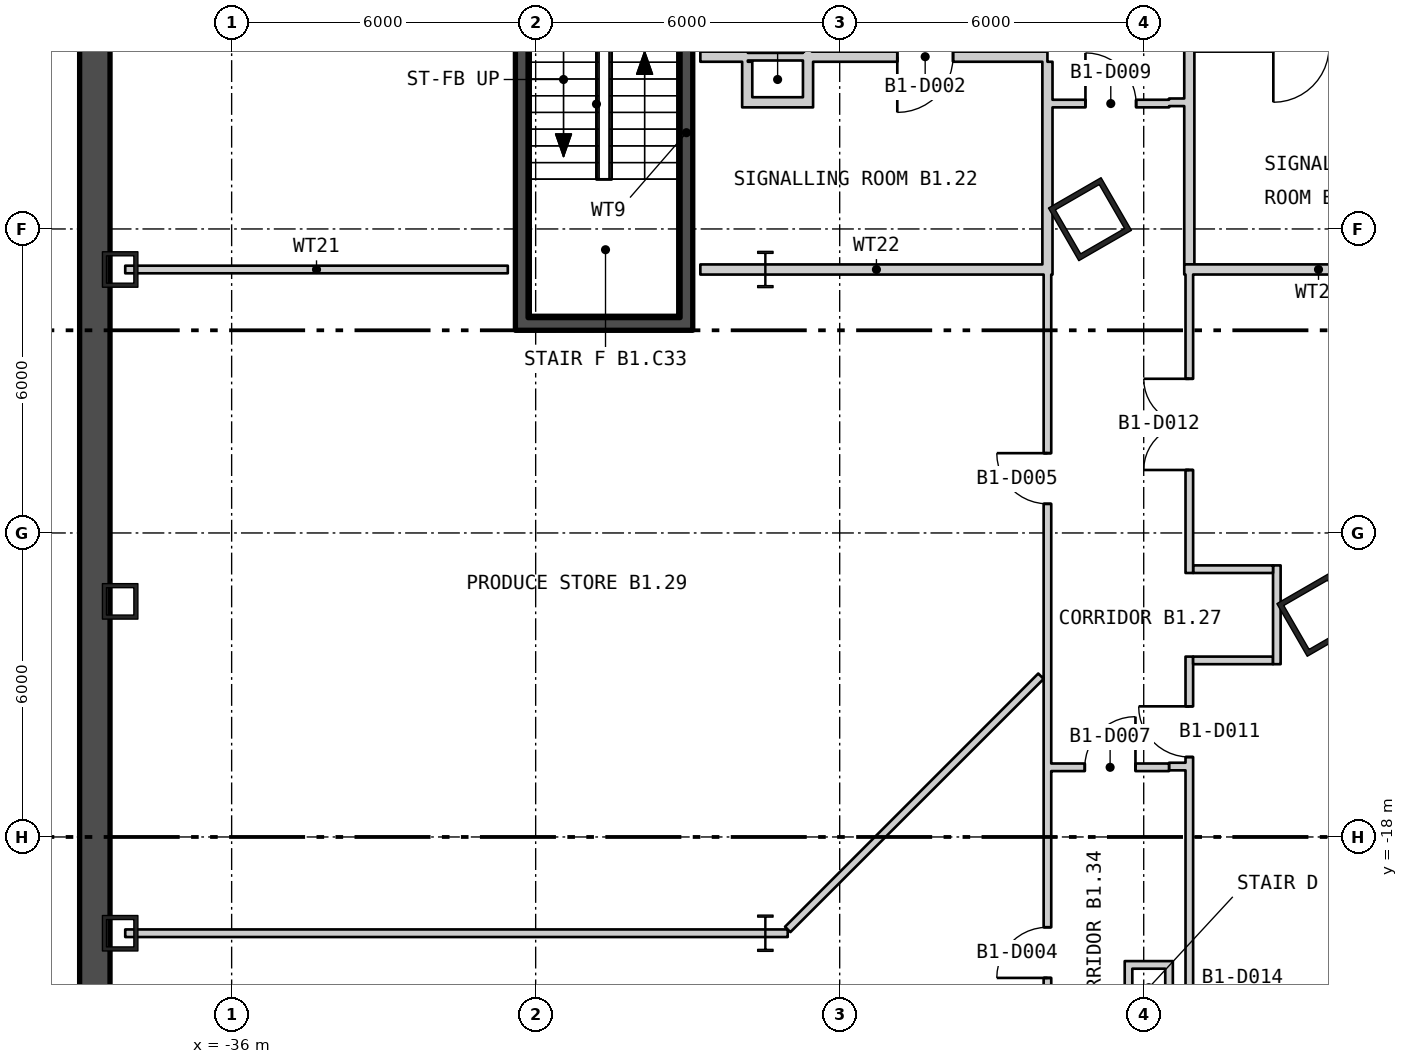
"""IFC4 building model, lengths in metres.
Left out: names, types, materials, properties, quantities, classifications, styles, units other than length and angle.
Written with IfcOpenShell. Run it as: python <this file> out.ifc"""

import sys

from ifc_helpers import new_model, si_unit, direction, frame, frame_2d, origin, origin_2d, place, context, subcontext, project, spatial, rectangle, hollow_rectangle, i_section, extrude, element, fill, save


model = new_model("IFC4")
c1 = context("Model", 3, precision=1e-05, world=origin(), true_north=direction((0.0, 1.0)))
c2 = subcontext(c1, "Body", "Model", "MODEL_VIEW")
j1 = project(units=[si_unit("LENGTHUNIT", "METRE"), si_unit("PLANEANGLEUNIT", "RADIAN")], contexts=[c1])
p1 = place(None, origin())
s1 = spatial("IfcSite", under=j1, at=p1, CompositionType="ELEMENT")
p2 = place(p1, origin())
s2 = spatial("IfcBuilding", under=s1, at=p2, CompositionType="ELEMENT")
p3 = place(p2, frame((0.0, 0.0, -5.7)))
s3 = spatial("IfcBuildingStorey", under=s2, at=p3, CompositionType="ELEMENT", Elevation=-5.7)
for number, where, z_axis, x_axis in (
    (1, (-19.061, -5.807, 0.0), (0.0, 0.0, 1.0), (0.5, -0.866, 0.0)),
    (2, (-14.553, -13.615, 0.0), (0.0, 0.0, 1.0), (0.5, -0.866, 0.0)),
):
    element("IfcColumn", number, at=place(p3, frame(where, z_axis=z_axis, x_axis=x_axis)), inside=s3, PredefinedType="COLUMN", context=c2, shape_type="SweptSolid", body=[
        extrude(hollow_rectangle(XDim=1.2, YDim=1.2, WallThickness=0.1, at=origin_2d()), origin(), (0.0, 0.0, 1.0), 5.7),
    ])
for number, where, z_axis, x_axis in (
    (3, (-38.2, -6.8, 0.0), (0.0, 0.0, 1.0), (0.0, -1.0, 0.0)),
    (4, (-38.2, -13.35, 0.0), (0.0, 0.0, 1.0), (0.0, -1.0, 0.0)),
    (5, (-38.2, -19.9, 0.0), (0.0, 0.0, 1.0), (0.0, -1.0, 0.0)),
):
    element("IfcColumn", number, at=place(p3, frame(where, z_axis=z_axis, x_axis=x_axis)), inside=s3, PredefinedType="COLUMN", context=c2, shape_type="SweptSolid", body=[
        extrude(hollow_rectangle(XDim=0.7, YDim=0.7, WallThickness=0.08, at=origin_2d()), origin(), (0.0, 0.0, 1.0), 5.7),
    ])
for number, where, z_axis, x_axis in (
    (6, (-25.467, -6.8, 0.0), (0.0, 0.0, 1.0), (1.0, 0.0, 0.0)),
    (7, (-25.467, -19.9, 0.0), (0.0, 0.0, 1.0), (1.0, 0.0, 0.0)),
):
    element("IfcColumn", number, at=place(p3, frame(where, z_axis=z_axis, x_axis=x_axis)), inside=s3, PredefinedType="COLUMN", context=c2, shape_type="SweptSolid", body=[
        extrude(i_section(OverallWidth=0.304, OverallDepth=0.716, WebThickness=0.021, FlangeThickness=0.04, at=origin_2d()), origin(), (0.0, 0.0, 1.0), 5.7),
    ])
p4 = place(p3, frame((-38.7, -33.2, -0.4), z_axis=(0.0, 0.0, 1.0), x_axis=(0.0, 1.0, 0.0)))
e8 = element("IfcWall", 8, at=p4, inside=s3, PredefinedType="STANDARD", context=c2, shape_type="SweptSolid", body=[
    extrude(rectangle(XDim=52.8, YDim=0.6, at=frame_2d((26.4, 0.0))), origin(), (0.0, 0.0, 1.0), 5.7),
])
p5 = place(p3, frame((-30.275, -7.75, 0.0), z_axis=(0.0, 0.0, 1.0), x_axis=(0.0, 1.0, 0.0)))
e9 = element("IfcWall", 9, at=p5, inside=s3, PredefinedType="SHEAR", context=c2, shape_type="SweptSolid", body=[
    extrude(rectangle(XDim=7.3, YDim=0.25, at=frame_2d((3.65, 0.0))), origin(), (0.0, 0.0, 1.0), 5.25),
])
p6 = place(p3, frame((-27.025, -7.75, 0.0), z_axis=(0.0, 0.0, 1.0), x_axis=(0.0, 1.0, 0.0)))
e10 = element("IfcWall", 10, at=p6, inside=s3, PredefinedType="SHEAR", context=c2, shape_type="SweptSolid", body=[
    extrude(rectangle(XDim=7.3, YDim=0.25, at=frame_2d((3.65, 0.0))), origin(), (0.0, 0.0, 1.0), 5.25),
])
p7 = place(p6, frame((5.7, 0.0, 0.0)))
e11 = element("IfcOpeningElement", 11, at=p7, cuts=e10, PredefinedType="OPENING", context=c2, shape_type="SweptSolid", body=[
    extrude(rectangle(XDim=1.2, YDim=2.1, at=frame_2d((0.6, 1.05))), frame((0.0, 0.135, 0.0), z_axis=(0.0, -1.0, 0.0), x_axis=(1.0, 0.0, 0.0)), (0.0, 0.0, 1.0), 0.27),
])
p8 = place(p3, frame((-30.4, -7.875, 0.0), z_axis=(0.0, 0.0, 1.0), x_axis=(1.0, 0.0, 0.0)))
e12 = element("IfcWall", 12, at=p8, inside=s3, PredefinedType="SHEAR", context=c2, shape_type="SweptSolid", body=[
    extrude(rectangle(XDim=3.5, YDim=0.25, at=frame_2d((1.75, 0.0))), origin(), (0.0, 0.0, 1.0), 5.25),
])
p9 = place(p3, frame((-38.1, -19.9, 0.0), z_axis=(0.0, 0.0, 1.0), x_axis=(1.0, 0.0, 0.0)))
e13 = element("IfcWall", 13, at=p9, inside=s3, PredefinedType="PARTITIONING", context=c2, shape_type="SweptSolid", body=[
    extrude(rectangle(XDim=13.074, YDim=0.15, at=frame_2d((6.537, 0.0))), origin(), (0.0, 0.0, 1.0), 5.25),
])
p10 = place(p3, frame((-38.1, -6.8, 0.0), z_axis=(0.0, 0.0, 1.0), x_axis=(1.0, 0.0, 0.0)))
e14 = element("IfcWall", 14, at=p10, inside=s3, PredefinedType="PARTITIONING", context=c2, shape_type="SweptSolid", body=[
    extrude(rectangle(XDim=7.55, YDim=0.15, at=frame_2d((3.775, 0.0))), origin(), (0.0, 0.0, 1.0), 5.25),
])
p11 = place(p3, frame((-26.75, -6.8, 0.0), z_axis=(0.0, 0.0, 1.0), x_axis=(1.0, 0.0, 0.0)))
e15 = element("IfcWall", 15, at=p11, inside=s3, PredefinedType="PARTITIONING", context=c2, shape_type="SweptSolid", body=[
    extrude(rectangle(XDim=6.95, YDim=0.2, at=frame_2d((3.475, 0.0))), origin(), (0.0, 0.0, 1.0), 5.25),
])
p12 = place(p3, frame((-26.75, -2.6, 0.0), z_axis=(0.0, 0.0, 1.0), x_axis=(1.0, 0.0, 0.0)))
e16 = element("IfcWall", 16, at=p12, inside=s3, PredefinedType="PARTITIONING", context=c2, shape_type="SweptSolid", body=[
    extrude(rectangle(XDim=0.937, YDim=0.2, at=frame_2d((0.469, 0.0))), origin(), (0.0, 0.0, 1.0), 5.25),
])
p13 = place(p3, frame((-25.925, -3.5, 0.0), z_axis=(0.0, 0.0, 1.0), x_axis=(1.0, 0.0, 0.0)))
e17 = element("IfcWall", 17, at=p13, inside=s3, PredefinedType="PARTITIONING", context=c2, shape_type="SweptSolid", body=[
    extrude(rectangle(XDim=1.4, YDim=0.2, at=frame_2d((0.7, 0.0))), origin(), (0.0, 0.0, 1.0), 5.25),
])
p14 = place(p3, frame((-25.825, -3.4, 0.0), z_axis=(0.0, 0.0, 1.0), x_axis=(0.0, 1.0, 0.0)))
e18 = element("IfcWall", 18, at=p14, inside=s3, PredefinedType="PARTITIONING", context=c2, shape_type="SweptSolid", body=[
    extrude(rectangle(XDim=0.7, YDim=0.2, at=frame_2d((0.35, 0.0))), origin(), (0.0, 0.0, 1.0), 5.25),
])
p15 = place(p3, frame((-25.813, -2.6, 0.0), z_axis=(0.0, 0.0, 1.0), x_axis=(1.0, 0.0, 0.0)))
e19 = element("IfcWall", 19, at=p15, inside=s3, PredefinedType="PARTITIONING", context=c2, shape_type="SweptSolid", body=[
    extrude(rectangle(XDim=1.088, YDim=0.15, at=frame_2d((0.544, 0.0))), origin(), (0.0, 0.0, 1.0), 5.25),
])
p16 = place(p3, frame((-25.026, -19.825, 0.0), z_axis=(0.0, 0.0, 1.0), x_axis=(0.707106781187, 0.707106781187, 0.0)))
e20 = element("IfcWall", 20, at=p16, inside=s3, PredefinedType="PARTITIONING", context=c2, shape_type="SweptSolid", body=[
    extrude(rectangle(XDim=7.068, YDim=0.15, at=frame_2d((3.534, 0.0))), origin(), (0.0, 0.0, 1.0), 5.25),
])
p17 = place(p3, frame((-24.725, -2.6, 0.0), z_axis=(0.0, 0.0, 1.0), x_axis=(1.0, 0.0, 0.0)))
e21 = element("IfcWall", 21, at=p17, inside=s3, PredefinedType="PARTITIONING", context=c2, shape_type="SweptSolid", body=[
    extrude(rectangle(XDim=4.825, YDim=0.2, at=frame_2d((2.413, 0.0))), origin(), (0.0, 0.0, 1.0), 5.25),
])
p18 = place(p17, frame((1.862, 0.0, 0.0)))
e22 = element("IfcOpeningElement", 22, at=p18, cuts=e21, PredefinedType="OPENING", context=c2, shape_type="SweptSolid", body=[
    extrude(rectangle(XDim=1.1, YDim=2.1, at=frame_2d((0.55, 1.05))), frame((0.0, 0.11, 0.0), z_axis=(0.0, -1.0, 0.0), x_axis=(1.0, 0.0, 0.0)), (0.0, 0.0, 1.0), 0.22),
])
p19 = place(p3, frame((-24.625, -3.4, 0.0), z_axis=(0.0, 0.0, 1.0), x_axis=(0.0, 1.0, 0.0)))
e23 = element("IfcWall", 23, at=p19, inside=s3, PredefinedType="PARTITIONING", context=c2, shape_type="SweptSolid", body=[
    extrude(rectangle(XDim=0.7, YDim=0.2, at=frame_2d((0.35, 0.0))), origin(), (0.0, 0.0, 1.0), 5.25),
])
p20 = place(p3, frame((-19.9, -23.775, 0.0), z_axis=(0.0, 0.0, 1.0), x_axis=(0.0, 1.0, 0.0)))
e24 = element("IfcWall", 24, at=p20, inside=s3, PredefinedType="PARTITIONING", context=c2, shape_type="SweptSolid", body=[
    extrude(rectangle(XDim=16.875, YDim=0.15, at=frame_2d((8.438, 0.0))), origin(), (0.0, 0.0, 1.0), 5.25),
])
p21 = place(p20, frame((2.993, 0.0, 0.0)))
e25 = element("IfcOpeningElement", 25, at=p21, cuts=e24, PredefinedType="OPENING", context=c2, shape_type="SweptSolid", body=[
    extrude(rectangle(XDim=1.0, YDim=2.1, at=frame_2d((0.5, 1.05))), frame((0.0, 0.085, 0.0), z_axis=(0.0, -1.0, 0.0), x_axis=(1.0, 0.0, 0.0)), (0.0, 0.0, 1.0), 0.17),
])
p22 = place(p20, frame((12.35, 0.0, 0.0)))
e26 = element("IfcOpeningElement", 26, at=p22, cuts=e24, PredefinedType="OPENING", context=c2, shape_type="SweptSolid", body=[
    extrude(rectangle(XDim=1.0, YDim=2.1, at=frame_2d((0.5, 1.05))), frame((0.0, 0.085, 0.0), z_axis=(0.0, -1.0, 0.0), x_axis=(1.0, 0.0, 0.0)), (0.0, 0.0, 1.0), 0.17),
])
p23 = place(p3, frame((-19.9, -6.7, 0.0), z_axis=(0.0, 0.0, 1.0), x_axis=(0.0, 1.0, 0.0)))
e27 = element("IfcWall", 27, at=p23, inside=s3, PredefinedType="PARTITIONING", context=c2, shape_type="SweptSolid", body=[
    extrude(rectangle(XDim=4.0, YDim=0.2, at=frame_2d((2.0, 0.0))), origin(), (0.0, 0.0, 1.0), 5.25),
])
p24 = place(p3, frame((-19.825, -16.625, 0.0), z_axis=(0.0, 0.0, 1.0), x_axis=(1.0, 0.0, 0.0)))
e28 = element("IfcWall", 28, at=p24, inside=s3, PredefinedType="PARTITIONING", context=c2, shape_type="SweptSolid", body=[
    extrude(rectangle(XDim=2.324, YDim=0.15, at=frame_2d((1.162, 0.0))), origin(), (0.0, 0.0, 1.0), 5.25),
])
p25 = place(p24, frame((0.662, 0.0, 0.0)))
e29 = element("IfcOpeningElement", 29, at=p25, cuts=e28, PredefinedType="OPENING", context=c2, shape_type="SweptSolid", body=[
    extrude(rectangle(XDim=1.0, YDim=2.1, at=frame_2d((0.5, 1.05))), frame((0.0, 0.085, 0.0), z_axis=(0.0, -1.0, 0.0), x_axis=(1.0, 0.0, 0.0)), (0.0, 0.0, 1.0), 0.17),
])
p26 = place(p3, frame((-19.8, -3.525, 0.0), z_axis=(0.0, 0.0, 1.0), x_axis=(1.0, 0.0, 0.0)))
e30 = element("IfcWall", 30, at=p26, inside=s3, PredefinedType="PARTITIONING", context=c2, shape_type="SweptSolid", body=[
    extrude(rectangle(XDim=2.3, YDim=0.15, at=frame_2d((1.15, 0.0))), origin(), (0.0, 0.0, 1.0), 5.25),
])
p27 = place(p26, frame((0.65, 0.0, 0.0)))
e31 = element("IfcOpeningElement", 31, at=p27, cuts=e30, PredefinedType="OPENING", context=c2, shape_type="SweptSolid", body=[
    extrude(rectangle(XDim=1.0, YDim=2.1, at=frame_2d((0.5, 1.05))), frame((0.0, 0.085, 0.0), z_axis=(0.0, -1.0, 0.0), x_axis=(1.0, 0.0, 0.0)), (0.0, 0.0, 1.0), 0.17),
])
p28 = place(p3, frame((-18.3, -21.5, 0.0), z_axis=(0.0, 0.0, 1.0), x_axis=(0.0, 1.0, 0.0)))
e32 = element("IfcWall", 32, at=p28, inside=s3, PredefinedType="PARTITIONING", context=c2, shape_type="SweptSolid", body=[
    extrude(rectangle(XDim=1.05, YDim=0.15, at=frame_2d((0.525, 0.0))), origin(), (0.0, 0.0, 1.0), 5.25),
])
p29 = place(p3, frame((-18.225, -20.525, 0.0), z_axis=(0.0, 0.0, 1.0), x_axis=(1.0, 0.0, 0.0)))
e33 = element("IfcWall", 33, at=p29, inside=s3, PredefinedType="PARTITIONING", context=c2, shape_type="SweptSolid", body=[
    extrude(rectangle(XDim=0.65, YDim=0.15, at=frame_2d((0.325, 0.0))), origin(), (0.0, 0.0, 1.0), 5.25),
])
p30 = place(p3, frame((-17.5, -21.5, 0.0), z_axis=(0.0, 0.0, 1.0), x_axis=(0.0, 1.0, 0.0)))
e34 = element("IfcWall", 34, at=p30, inside=s3, PredefinedType="PARTITIONING", context=c2, shape_type="SweptSolid", body=[
    extrude(rectangle(XDim=1.05, YDim=0.15, at=frame_2d((0.525, 0.0))), origin(), (0.0, 0.0, 1.0), 5.25),
])
p31 = place(p3, frame((-17.5, -16.61, 0.0), z_axis=(0.0, 0.0, 1.0), x_axis=(1.0, 0.0, 0.0)))
e35 = element("IfcWall", 35, at=p31, inside=s3, PredefinedType="PARTITIONING", context=c2, shape_type="SweptSolid", body=[
    extrude(rectangle(XDim=0.325, YDim=0.15, at=frame_2d((0.163, 0.0))), origin(), (0.0, 0.0, 1.0), 5.25),
])
p32 = place(p3, frame((-17.5, -3.5, 0.0), z_axis=(0.0, 0.0, 1.0), x_axis=(1.0, 0.0, 0.0)))
e36 = element("IfcWall", 36, at=p32, inside=s3, PredefinedType="PARTITIONING", context=c2, shape_type="SweptSolid", body=[
    extrude(rectangle(XDim=0.3, YDim=0.15, at=frame_2d((0.15, 0.0))), origin(), (0.0, 0.0, 1.0), 5.25),
])
p33 = place(p3, frame((-17.2, -6.799, 0.0), z_axis=(0.0, 0.0, 1.0), x_axis=(0.999999982193, -0.000188714848, 0.0)))
e37 = element("IfcWall", 37, at=p33, inside=s3, PredefinedType="PARTITIONING", context=c2, shape_type="SweptSolid", body=[
    extrude(rectangle(XDim=5.299, YDim=0.2, at=frame_2d((2.65, 0.0))), origin(), (0.0, 0.0, 1.0), 5.25),
])
p34 = place(p3, frame((-17.1, -21.225, 0.0), z_axis=(0.0, 0.0, 1.0), x_axis=(0.0, 1.0, 0.0)))
e38 = element("IfcWall", 38, at=p34, inside=s3, PredefinedType="PARTITIONING", context=c2, shape_type="SweptSolid", body=[
    extrude(rectangle(XDim=6.785, YDim=0.15, at=frame_2d((3.393, 0.0))), origin(), (0.0, 0.0, 1.0), 5.25),
])
p35 = place(p34, frame((4.803, 0.0, 0.0)))
e39 = element("IfcOpeningElement", 39, at=p35, cuts=e38, PredefinedType="OPENING", context=c2, shape_type="SweptSolid", body=[
    extrude(rectangle(XDim=1.0, YDim=2.1, at=frame_2d((0.5, 1.05))), frame((0.0, 0.085, 0.0), z_axis=(0.0, -1.0, 0.0), x_axis=(1.0, 0.0, 0.0)), (0.0, 0.0, 1.0), 0.17),
])
p36 = place(p3, frame((-17.1, -12.79, 0.0), z_axis=(0.0, 0.0, 1.0), x_axis=(0.0, 1.0, 0.0)))
e40 = element("IfcWall", 40, at=p36, inside=s3, PredefinedType="PARTITIONING", context=c2, shape_type="SweptSolid", body=[
    extrude(rectangle(XDim=5.891, YDim=0.15, at=frame_2d((2.946, 0.0))), origin(), (0.0, 0.0, 1.0), 5.25),
])
p37 = place(p36, frame((2.033, 0.0, 0.0)))
e41 = element("IfcOpeningElement", 41, at=p37, cuts=e40, PredefinedType="OPENING", context=c2, shape_type="SweptSolid", body=[
    extrude(rectangle(XDim=1.8, YDim=2.1, at=frame_2d((0.9, 1.05))), frame((0.0, 0.085, 0.0), z_axis=(0.0, -1.0, 0.0), x_axis=(1.0, 0.0, 0.0)), (0.0, 0.0, 1.0), 0.17),
])
p38 = place(p3, frame((-17.1, -6.699, 0.0), z_axis=(0.0, 0.0, 1.0), x_axis=(0.0, 1.0, 0.0)))
e42 = element("IfcWall", 42, at=p38, inside=s3, PredefinedType="PARTITIONING", context=c2, shape_type="SweptSolid", body=[
    extrude(rectangle(XDim=4.399, YDim=0.2, at=frame_2d((2.2, 0.0))), origin(), (0.0, 0.0, 1.0), 5.25),
])
for number, where, z_axis, x_axis in (
    (43, (-17.025, -14.515, 0.0), (0.0, 0.0, 1.0), (1.0, 0.0, 0.0)),
    (44, (-17.025, -12.715, 0.0), (0.0, 0.0, 1.0), (1.0, 0.0, 0.0)),
):
    element("IfcWall", number, at=place(p3, frame(where, z_axis=z_axis, x_axis=x_axis)), inside=s3, PredefinedType="PARTITIONING", context=c2, shape_type="SweptSolid", body=[
        extrude(rectangle(XDim=1.577, YDim=0.15, at=frame_2d((0.788, 0.0))), origin(), (0.0, 0.0, 1.0), 5.25),
    ])
p39 = place(p3, frame((-15.373, -14.59, 0.0), z_axis=(0.0, 0.0, 1.0), x_axis=(0.0, 1.0, 0.0)))
e45 = element("IfcWall", 45, at=p39, inside=s3, PredefinedType="PARTITIONING", context=c2, shape_type="SweptSolid", body=[
    extrude(rectangle(XDim=1.95, YDim=0.15, at=frame_2d((0.975, 0.0))), origin(), (0.0, 0.0, 1.0), 5.25),
])
p40 = place(p18, origin())
e46 = element("IfcDoor", 46, at=p40, inside=s3, OperationType="SINGLE_SWING_LEFT", PredefinedType="DOOR", context=c2, shape_type="SweptSolid", body=[
    extrude(rectangle(XDim=1.1, YDim=2.1, at=frame_2d((0.55, 1.05))), frame((0.0, 0.025, 0.0), z_axis=(0.0, -1.0, 0.0), x_axis=(1.0, 0.0, 0.0)), (0.0, 0.0, 1.0), 0.05),
])
fill(e22, e46)
p41 = place(p21, origin())
e47 = element("IfcDoor", 47, at=p41, inside=s3, OperationType="SINGLE_SWING_RIGHT", PredefinedType="DOOR", context=c2, shape_type="SweptSolid", body=[
    extrude(rectangle(XDim=1.0, YDim=2.1, at=frame_2d((0.5, 1.05))), frame((0.0, 0.025, 0.0), z_axis=(0.0, -1.0, 0.0), x_axis=(1.0, 0.0, 0.0)), (0.0, 0.0, 1.0), 0.05),
])
fill(e25, e47)
p42 = place(p22, origin())
e48 = element("IfcDoor", 48, at=p42, inside=s3, OperationType="SINGLE_SWING_LEFT", PredefinedType="DOOR", context=c2, shape_type="SweptSolid", body=[
    extrude(rectangle(XDim=1.0, YDim=2.1, at=frame_2d((0.5, 1.05))), frame((0.0, 0.025, 0.0), z_axis=(0.0, -1.0, 0.0), x_axis=(1.0, 0.0, 0.0)), (0.0, 0.0, 1.0), 0.05),
])
fill(e26, e48)
p43 = place(p25, origin())
e49 = element("IfcDoor", 49, at=p43, inside=s3, OperationType="SINGLE_SWING_LEFT", PredefinedType="DOOR", context=c2, shape_type="SweptSolid", body=[
    extrude(rectangle(XDim=1.0, YDim=2.1, at=frame_2d((0.5, 1.05))), frame((0.0, 0.025, 0.0), z_axis=(0.0, -1.0, 0.0), x_axis=(1.0, 0.0, 0.0)), (0.0, 0.0, 1.0), 0.05),
])
fill(e29, e49)
p44 = place(p27, origin())
e50 = element("IfcDoor", 50, at=p44, inside=s3, OperationType="SINGLE_SWING_RIGHT", PredefinedType="DOOR", context=c2, shape_type="SweptSolid", body=[
    extrude(rectangle(XDim=1.0, YDim=2.1, at=frame_2d((0.5, 1.05))), frame((0.0, 0.025, 0.0), z_axis=(0.0, -1.0, 0.0), x_axis=(1.0, 0.0, 0.0)), (0.0, 0.0, 1.0), 0.05),
])
fill(e31, e50)
p45 = place(p35, origin())
e51 = element("IfcDoor", 51, at=p45, inside=s3, OperationType="SINGLE_SWING_LEFT", PredefinedType="DOOR", context=c2, shape_type="SweptSolid", body=[
    extrude(rectangle(XDim=1.0, YDim=2.1, at=frame_2d((0.5, 1.05))), frame((0.0, 0.025, 0.0), z_axis=(0.0, -1.0, 0.0), x_axis=(1.0, 0.0, 0.0)), (0.0, 0.0, 1.0), 0.05),
])
fill(e39, e51)
p46 = place(p37, origin())
e52 = element("IfcDoor", 52, at=p46, inside=s3, OperationType="DOUBLE_DOOR_SINGLE_SWING", PredefinedType="DOOR", context=c2, shape_type="SweptSolid", body=[
    extrude(rectangle(XDim=1.8, YDim=2.1, at=frame_2d((0.9, 1.05))), frame((0.0, 0.025, 0.0), z_axis=(0.0, -1.0, 0.0), x_axis=(1.0, 0.0, 0.0)), (0.0, 0.0, 1.0), 0.05),
])
fill(e41, e52)
save(model, sys.argv[1])
